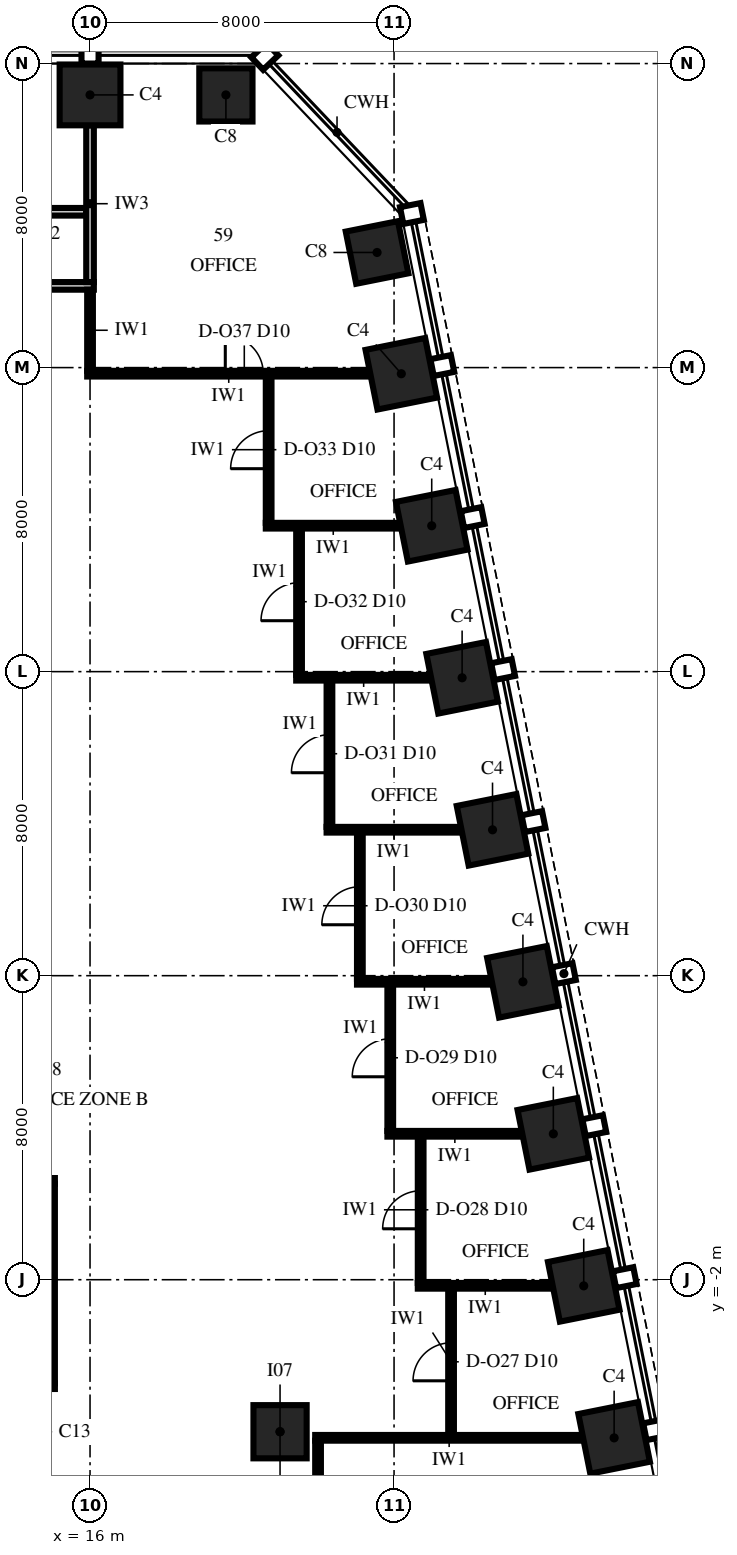
"""IFC4 building model, lengths in metres.
Left out: names, types, materials, properties, quantities, classifications, styles, units other than length and angle.
Written with IfcOpenShell. Run it as: python <this file> out.ifc"""

import sys

from ifc_helpers import new_model, si_unit, direction, frame, frame_2d, origin, origin_2d, place, context, subcontext, project, spatial, rectangle, extrude, element, fill, save


model = new_model("IFC4")
c1 = context("Model", 3, precision=1e-05, world=origin(), true_north=direction((0.0, 1.0)))
c2 = subcontext(c1, "Body", "Model", "MODEL_VIEW")
j1 = project(units=[si_unit("LENGTHUNIT", "METRE"), si_unit("PLANEANGLEUNIT", "RADIAN")], contexts=[c1])
p1 = place(None, origin())
s1 = spatial("IfcSite", under=j1, at=p1, CompositionType="ELEMENT")
p2 = place(p1, origin())
s2 = spatial("IfcBuilding", under=s1, at=p2, CompositionType="ELEMENT")
p3 = place(p2, frame((0.0, 0.0, 202.0)))
s3 = spatial("IfcBuildingStorey", under=s2, at=p3, CompositionType="ELEMENT", Elevation=202.0)
for number, where, z_axis, x_axis in (
    (1, (29.791, -6.162, 0.0), (0.0, 0.0, 1.0), (-0.196, 0.981, 0.0)),
    (2, (28.991, -2.162, 0.0), (0.0, 0.0, 1.0), (-0.196, 0.981, 0.0)),
    (3, (28.191, 1.838, 0.0), (0.0, 0.0, 1.0), (-0.196, 0.981, 0.0)),
    (4, (27.391, 5.838, 0.0), (0.0, 0.0, 1.0), (-0.196, 0.981, 0.0)),
    (5, (26.591, 9.838, 0.0), (0.0, 0.0, 1.0), (-0.196, 0.981, 0.0)),
    (6, (25.791, 13.838, 0.0), (0.0, 0.0, 1.0), (-0.196, 0.981, 0.0)),
    (7, (24.991, 17.838, 0.0), (0.0, 0.0, 1.0), (-0.196, 0.981, 0.0)),
    (8, (24.191, 21.838, 0.0), (0.0, 0.0, 1.0), (-0.196, 0.981, 0.0)),
):
    element("IfcColumn", number, at=place(p3, frame(where, z_axis=z_axis, x_axis=x_axis)), inside=s3, PredefinedType="COLUMN", context=c2, shape_type="SweptSolid", body=[
        extrude(rectangle(XDim=1.6, YDim=1.6, at=origin_2d()), origin(), (0.0, 0.0, 1.0), 4.0),
    ])
for number, where, z_axis, x_axis in (
    (9, (23.553, 25.029, 0.0), (0.0, 0.0, 1.0), (-0.196, 0.981, 0.0)),
    (10, (19.575, 29.175, 0.0), (0.0, 0.0, 1.0), (-1.0, 0.0, 0.0)),
):
    element("IfcColumn", number, at=place(p3, frame(where, z_axis=z_axis, x_axis=x_axis)), inside=s3, PredefinedType="COLUMN", context=c2, shape_type="SweptSolid", body=[
        extrude(rectangle(XDim=1.4, YDim=1.4, at=origin_2d()), origin(), (0.0, 0.0, 1.0), 4.0),
    ])
p4 = place(p3, frame((16.0, 29.175, 0.0), z_axis=(0.0, 0.0, 1.0), x_axis=(-1.0, 0.0, 0.0)))
e11 = element("IfcColumn", 11, at=p4, inside=s3, PredefinedType="COLUMN", context=c2, shape_type="SweptSolid", body=[
    extrude(rectangle(XDim=1.6, YDim=1.6, at=origin_2d()), origin(), (0.0, 0.0, 1.0), 4.0),
])
p5 = place(p3, frame((21.0, -6.0, 0.0), z_axis=(0.0, 0.0, 1.0), x_axis=(1.0, 0.0, 0.0)))
e12 = element("IfcColumn", 12, at=p5, inside=s3, PredefinedType="COLUMN", context=c2, shape_type="SweptSolid", body=[
    extrude(rectangle(XDim=1.4, YDim=1.4, at=origin_2d()), origin(), (0.0, 0.0, 1.0), 4.0),
])
p6 = place(p3, frame((21.925, -6.16, 0.0), z_axis=(0.0, 0.0, 1.0), x_axis=(1.0, 0.0, 0.0)))
e13 = element("IfcWall", 13, at=p6, inside=s3, PredefinedType="PARTITIONING", context=c2, shape_type="SweptSolid", body=[
    extrude(rectangle(XDim=7.05, YDim=0.15, at=frame_2d((3.525, 0.0))), origin(), (0.0, 0.0, 1.0), 2.842),
])
p7 = place(p3, frame((12.0, -4.8, 0.0), z_axis=(0.0, 0.0, 1.0), x_axis=(1.0, 0.0, 0.0)))
e14 = element("IfcWall", 14, at=p7, inside=s3, PredefinedType="PARTITIONING", context=c2, shape_type="SweptSolid", body=[
    extrude(rectangle(XDim=3.075, YDim=0.15, at=frame_2d((1.538, 0.0))), origin(), (0.0, 0.0, 1.0), 3.25),
])
p8 = place(p3, frame((24.625, -2.16, 0.0), z_axis=(0.0, 0.0, 1.0), x_axis=(1.0, 0.0, 0.0)))
e15 = element("IfcWall", 15, at=p8, inside=s3, PredefinedType="PARTITIONING", context=c2, shape_type="SweptSolid", body=[
    extrude(rectangle(XDim=3.55, YDim=0.15, at=frame_2d((1.775, 0.0))), origin(), (0.0, 0.0, 1.0), 3.25),
])
p9 = place(p3, frame((12.0, 0.6, 0.0), z_axis=(0.0, 0.0, 1.0), x_axis=(1.0, 0.0, 0.0)))
e16 = element("IfcWall", 16, at=p9, inside=s3, PredefinedType="PARTITIONING", context=c2, shape_type="SweptSolid", body=[
    extrude(rectangle(XDim=3.075, YDim=0.15, at=frame_2d((1.538, 0.0))), origin(), (0.0, 0.0, 1.0), 3.25),
])
p10 = place(p9, frame((1.0, 0.0, 0.0)))
e17 = element("IfcOpeningElement", 17, at=p10, cuts=e16, PredefinedType="OPENING", context=c2, shape_type="SweptSolid", body=[
    extrude(rectangle(XDim=1.0, YDim=2.3, at=frame_2d((0.5, 1.15))), frame((0.0, 0.09, 0.0), z_axis=(0.0, -1.0, 0.0), x_axis=(1.0, 0.0, 0.0)), (0.0, 0.0, 1.0), 0.18),
])
p11 = place(p3, frame((23.825, 1.84, 0.0), z_axis=(0.0, 0.0, 1.0), x_axis=(1.0, 0.0, 0.0)))
e18 = element("IfcWall", 18, at=p11, inside=s3, PredefinedType="PARTITIONING", context=c2, shape_type="SweptSolid", body=[
    extrude(rectangle(XDim=3.55, YDim=0.15, at=frame_2d((1.775, 0.0))), origin(), (0.0, 0.0, 1.0), 3.25),
])
p12 = place(p3, frame((23.025, 5.84, 0.0), z_axis=(0.0, 0.0, 1.0), x_axis=(1.0, 0.0, 0.0)))
e19 = element("IfcWall", 19, at=p12, inside=s3, PredefinedType="PARTITIONING", context=c2, shape_type="SweptSolid", body=[
    extrude(rectangle(XDim=3.55, YDim=0.15, at=frame_2d((1.775, 0.0))), origin(), (0.0, 0.0, 1.0), 2.842),
])
for number, where, z_axis, x_axis in (
    (20, (22.225, 9.84, 0.0), (0.0, 0.0, 1.0), (1.0, 0.0, 0.0)),
    (21, (21.425, 13.84, 0.0), (0.0, 0.0, 1.0), (1.0, 0.0, 0.0)),
    (22, (20.625, 17.84, 0.0), (0.0, 0.0, 1.0), (1.0, 0.0, 0.0)),
):
    element("IfcWall", number, at=place(p3, frame(where, z_axis=z_axis, x_axis=x_axis)), inside=s3, PredefinedType="PARTITIONING", context=c2, shape_type="SweptSolid", body=[
        extrude(rectangle(XDim=3.55, YDim=0.15, at=frame_2d((1.775, 0.0))), origin(), (0.0, 0.0, 1.0), 3.25),
    ])
p13 = place(p3, frame((15.925, 21.84, 0.0), z_axis=(0.0, 0.0, 1.0), x_axis=(1.0, 0.0, 0.0)))
e23 = element("IfcWall", 23, at=p13, inside=s3, PredefinedType="PARTITIONING", context=c2, shape_type="SweptSolid", body=[
    extrude(rectangle(XDim=7.45, YDim=0.15, at=frame_2d((3.725, 0.0))), origin(), (0.0, 0.0, 1.0), 3.25),
])
p14 = place(p13, frame((3.634, 0.0, 0.0)))
e24 = element("IfcOpeningElement", 24, at=p14, cuts=e23, PredefinedType="OPENING", context=c2, shape_type="SweptSolid", body=[
    extrude(rectangle(XDim=1.0, YDim=2.3, at=frame_2d((0.5, 1.15))), frame((0.0, 0.09, 0.0), z_axis=(0.0, -1.0, 0.0), x_axis=(1.0, 0.0, 0.0)), (0.0, 0.0, 1.0), 0.18),
])
p15 = place(p3, frame((14.18, 24.15, 0.0), z_axis=(0.0, 0.0, 1.0), x_axis=(1.0, 0.0, 0.0)))
e25 = element("IfcWall", 25, at=p15, inside=s3, PredefinedType="PARTITIONING", context=c2, shape_type="SweptSolid", body=[
    extrude(rectangle(XDim=1.92, YDim=0.2, at=frame_2d((0.96, 0.0))), origin(), (0.0, 0.0, 1.0), 3.4),
])
p16 = place(p3, frame((-16.2, 26.1, 0.0), z_axis=(0.0, 0.0, 1.0), x_axis=(1.0, 0.0, 0.0)))
e26 = element("IfcWall", 26, at=p16, inside=s3, PredefinedType="PARTITIONING", context=c2, shape_type="SweptSolid", body=[
    extrude(rectangle(XDim=32.1, YDim=0.2, at=frame_2d((16.05, 0.0))), origin(), (0.0, 0.0, 1.0), 3.4),
])
p17 = place(p16, frame((1.6, 0.0, 0.0)))
e27 = element("IfcOpeningElement", 27, at=p17, cuts=e26, PredefinedType="OPENING", context=c2, shape_type="SweptSolid", body=[
    extrude(rectangle(XDim=1.2, YDim=2.4, at=frame_2d((0.6, 1.2))), frame((0.0, 0.115, 0.0), z_axis=(0.0, -1.0, 0.0), x_axis=(1.0, 0.0, 0.0)), (0.0, 0.0, 1.0), 0.23),
])
p18 = place(p16, frame((5.6, 0.0, 0.0)))
e28 = element("IfcOpeningElement", 28, at=p18, cuts=e26, PredefinedType="OPENING", context=c2, shape_type="SweptSolid", body=[
    extrude(rectangle(XDim=1.2, YDim=2.4, at=frame_2d((0.6, 1.2))), frame((0.0, 0.115, 0.0), z_axis=(0.0, -1.0, 0.0), x_axis=(1.0, 0.0, 0.0)), (0.0, 0.0, 1.0), 0.23),
])
p19 = place(p16, frame((9.6, 0.0, 0.0)))
e29 = element("IfcOpeningElement", 29, at=p19, cuts=e26, PredefinedType="OPENING", context=c2, shape_type="SweptSolid", body=[
    extrude(rectangle(XDim=1.2, YDim=2.4, at=frame_2d((0.6, 1.2))), frame((0.0, 0.115, 0.0), z_axis=(0.0, -1.0, 0.0), x_axis=(1.0, 0.0, 0.0)), (0.0, 0.0, 1.0), 0.23),
])
p20 = place(p16, frame((13.6, 0.0, 0.0)))
e30 = element("IfcOpeningElement", 30, at=p20, cuts=e26, PredefinedType="OPENING", context=c2, shape_type="SweptSolid", body=[
    extrude(rectangle(XDim=1.2, YDim=2.4, at=frame_2d((0.6, 1.2))), frame((0.0, 0.115, 0.0), z_axis=(0.0, -1.0, 0.0), x_axis=(1.0, 0.0, 0.0)), (0.0, 0.0, 1.0), 0.23),
])
p21 = place(p16, frame((17.6, 0.0, 0.0)))
e31 = element("IfcOpeningElement", 31, at=p21, cuts=e26, PredefinedType="OPENING", context=c2, shape_type="SweptSolid", body=[
    extrude(rectangle(XDim=1.2, YDim=2.4, at=frame_2d((0.6, 1.2))), frame((0.0, 0.115, 0.0), z_axis=(0.0, -1.0, 0.0), x_axis=(1.0, 0.0, 0.0)), (0.0, 0.0, 1.0), 0.23),
])
p22 = place(p16, frame((21.6, 0.0, 0.0)))
e32 = element("IfcOpeningElement", 32, at=p22, cuts=e26, PredefinedType="OPENING", context=c2, shape_type="SweptSolid", body=[
    extrude(rectangle(XDim=1.2, YDim=2.4, at=frame_2d((0.6, 1.2))), frame((0.0, 0.115, 0.0), z_axis=(0.0, -1.0, 0.0), x_axis=(1.0, 0.0, 0.0)), (0.0, 0.0, 1.0), 0.23),
])
p23 = place(p16, frame((25.6, 0.0, 0.0)))
e33 = element("IfcOpeningElement", 33, at=p23, cuts=e26, PredefinedType="OPENING", context=c2, shape_type="SweptSolid", body=[
    extrude(rectangle(XDim=1.2, YDim=2.4, at=frame_2d((0.6, 1.2))), frame((0.0, 0.115, 0.0), z_axis=(0.0, -1.0, 0.0), x_axis=(1.0, 0.0, 0.0)), (0.0, 0.0, 1.0), 0.23),
])
p24 = place(p16, frame((29.6, 0.0, 0.0)))
e34 = element("IfcOpeningElement", 34, at=p24, cuts=e26, PredefinedType="OPENING", context=c2, shape_type="SweptSolid", body=[
    extrude(rectangle(XDim=1.2, YDim=2.4, at=frame_2d((0.6, 1.2))), frame((0.0, 0.115, 0.0), z_axis=(0.0, -1.0, 0.0), x_axis=(1.0, 0.0, 0.0)), (0.0, 0.0, 1.0), 0.23),
])
p25 = place(p3, frame((15.0, -4.725, 0.0), z_axis=(0.0, 0.0, 1.0), x_axis=(0.0, 1.0, 0.0)))
e35 = element("IfcWall", 35, at=p25, inside=s3, PredefinedType="PARTITIONING", context=c2, shape_type="SweptSolid", body=[
    extrude(rectangle(XDim=5.25, YDim=0.15, at=frame_2d((2.625, 0.0))), origin(), (0.0, 0.0, 1.0), 3.85),
])
p26 = place(p3, frame((16.0, 21.915, 0.0), z_axis=(0.0, 0.0, 1.0), x_axis=(0.0, 1.0, 0.0)))
e36 = element("IfcWall", 36, at=p26, inside=s3, PredefinedType="PARTITIONING", context=c2, shape_type="SweptSolid", body=[
    extrude(rectangle(XDim=2.135, YDim=0.15, at=frame_2d((1.067, 0.0))), origin(), (0.0, 0.0, 1.0), 3.4),
])
p27 = place(p3, frame((16.0, 24.25, 0.0), z_axis=(0.0, 0.0, 1.0), x_axis=(0.0, 1.0, 0.0)))
e37 = element("IfcWall", 37, at=p27, inside=s3, PredefinedType="PARTITIONING", context=c2, shape_type="SweptSolid", body=[
    extrude(rectangle(XDim=4.125, YDim=0.2, at=frame_2d((2.062, 0.0))), origin(), (0.0, 0.0, 1.0), 3.4),
])
p28 = place(p3, frame((20.7, 17.915, 0.0), z_axis=(0.0, 0.0, 1.0), x_axis=(0.0, 1.0, 0.0)))
e38 = element("IfcWall", 38, at=p28, inside=s3, PredefinedType="PARTITIONING", context=c2, shape_type="SweptSolid", body=[
    extrude(rectangle(XDim=3.85, YDim=0.15, at=frame_2d((1.925, 0.0))), origin(), (0.0, 0.0, 1.0), 3.25),
])
p29 = place(p28, frame((1.425, 0.0, 0.0)))
e39 = element("IfcOpeningElement", 39, at=p29, cuts=e38, PredefinedType="OPENING", context=c2, shape_type="SweptSolid", body=[
    extrude(rectangle(XDim=1.0, YDim=2.3, at=frame_2d((0.5, 1.15))), frame((0.0, 0.09, 0.0), z_axis=(0.0, -1.0, 0.0), x_axis=(1.0, 0.0, 0.0)), (0.0, 0.0, 1.0), 0.18),
])
p30 = place(p3, frame((21.5, 13.915, 0.0), z_axis=(0.0, 0.0, 1.0), x_axis=(0.0, 1.0, 0.0)))
e40 = element("IfcWall", 40, at=p30, inside=s3, PredefinedType="PARTITIONING", context=c2, shape_type="SweptSolid", body=[
    extrude(rectangle(XDim=3.85, YDim=0.15, at=frame_2d((1.925, 0.0))), origin(), (0.0, 0.0, 1.0), 3.25),
])
p31 = place(p30, frame((1.425, 0.0, 0.0)))
e41 = element("IfcOpeningElement", 41, at=p31, cuts=e40, PredefinedType="OPENING", context=c2, shape_type="SweptSolid", body=[
    extrude(rectangle(XDim=1.0, YDim=2.3, at=frame_2d((0.5, 1.15))), frame((0.0, 0.09, 0.0), z_axis=(0.0, -1.0, 0.0), x_axis=(1.0, 0.0, 0.0)), (0.0, 0.0, 1.0), 0.18),
])
p32 = place(p3, frame((22.0, -16.375, 0.0), z_axis=(0.0, 0.0, 1.0), x_axis=(0.0, 1.0, 0.0)))
e42 = element("IfcWall", 42, at=p32, inside=s3, PredefinedType="PARTITIONING", context=c2, shape_type="SweptSolid", body=[
    extrude(rectangle(XDim=10.14, YDim=0.15, at=frame_2d((5.07, 0.0))), origin(), (0.0, 0.0, 1.0), 3.25),
])
p33 = place(p32, frame((5.975, 0.0, 0.0)))
e43 = element("IfcOpeningElement", 43, at=p33, cuts=e42, PredefinedType="OPENING", context=c2, shape_type="SweptSolid", body=[
    extrude(rectangle(XDim=1.8, YDim=2.4, at=frame_2d((0.9, 1.2))), frame((0.0, 0.09, 0.0), z_axis=(0.0, -1.0, 0.0), x_axis=(1.0, 0.0, 0.0)), (0.0, 0.0, 1.0), 0.18),
])
p34 = place(p3, frame((22.3, 9.915, 0.0), z_axis=(0.0, 0.0, 1.0), x_axis=(0.0, 1.0, 0.0)))
e44 = element("IfcWall", 44, at=p34, inside=s3, PredefinedType="PARTITIONING", context=c2, shape_type="SweptSolid", body=[
    extrude(rectangle(XDim=3.85, YDim=0.15, at=frame_2d((1.925, 0.0))), origin(), (0.0, 0.0, 1.0), 3.85),
])
p35 = place(p34, frame((1.425, 0.0, 0.0)))
e45 = element("IfcOpeningElement", 45, at=p35, cuts=e44, PredefinedType="OPENING", context=c2, shape_type="SweptSolid", body=[
    extrude(rectangle(XDim=1.0, YDim=2.3, at=frame_2d((0.5, 1.15))), frame((0.0, 0.09, 0.0), z_axis=(0.0, -1.0, 0.0), x_axis=(1.0, 0.0, 0.0)), (0.0, 0.0, 1.0), 0.18),
])
p36 = place(p3, frame((23.1, 5.915, 0.0), z_axis=(0.0, 0.0, 1.0), x_axis=(0.0, 1.0, 0.0)))
e46 = element("IfcWall", 46, at=p36, inside=s3, PredefinedType="PARTITIONING", context=c2, shape_type="SweptSolid", body=[
    extrude(rectangle(XDim=3.85, YDim=0.15, at=frame_2d((1.925, 0.0))), origin(), (0.0, 0.0, 1.0), 2.842),
])
p37 = place(p36, frame((1.425, 0.0, 0.0)))
e47 = element("IfcOpeningElement", 47, at=p37, cuts=e46, PredefinedType="OPENING", context=c2, shape_type="SweptSolid", body=[
    extrude(rectangle(XDim=1.0, YDim=2.3, at=frame_2d((0.5, 1.15))), frame((0.0, 0.09, 0.0), z_axis=(0.0, -1.0, 0.0), x_axis=(1.0, 0.0, 0.0)), (0.0, 0.0, 1.0), 0.18),
])
p38 = place(p3, frame((23.9, 1.915, 0.0), z_axis=(0.0, 0.0, 1.0), x_axis=(0.0, 1.0, 0.0)))
e48 = element("IfcWall", 48, at=p38, inside=s3, PredefinedType="PARTITIONING", context=c2, shape_type="SweptSolid", body=[
    extrude(rectangle(XDim=3.85, YDim=0.15, at=frame_2d((1.925, 0.0))), origin(), (0.0, 0.0, 1.0), 3.85),
])
p39 = place(p38, frame((1.425, 0.0, 0.0)))
e49 = element("IfcOpeningElement", 49, at=p39, cuts=e48, PredefinedType="OPENING", context=c2, shape_type="SweptSolid", body=[
    extrude(rectangle(XDim=1.0, YDim=2.3, at=frame_2d((0.5, 1.15))), frame((0.0, 0.09, 0.0), z_axis=(0.0, -1.0, 0.0), x_axis=(1.0, 0.0, 0.0)), (0.0, 0.0, 1.0), 0.18),
])
p40 = place(p3, frame((24.7, -2.085, 0.0), z_axis=(0.0, 0.0, 1.0), x_axis=(0.0, 1.0, 0.0)))
e50 = element("IfcWall", 50, at=p40, inside=s3, PredefinedType="PARTITIONING", context=c2, shape_type="SweptSolid", body=[
    extrude(rectangle(XDim=3.85, YDim=0.15, at=frame_2d((1.925, 0.0))), origin(), (0.0, 0.0, 1.0), 3.85),
])
p41 = place(p40, frame((1.425, 0.0, 0.0)))
e51 = element("IfcOpeningElement", 51, at=p41, cuts=e50, PredefinedType="OPENING", context=c2, shape_type="SweptSolid", body=[
    extrude(rectangle(XDim=1.0, YDim=2.3, at=frame_2d((0.5, 1.15))), frame((0.0, 0.09, 0.0), z_axis=(0.0, -1.0, 0.0), x_axis=(1.0, 0.0, 0.0)), (0.0, 0.0, 1.0), 0.18),
])
p42 = place(p3, frame((25.5, -6.085, 0.0), z_axis=(0.0, 0.0, 1.0), x_axis=(0.0, 1.0, 0.0)))
e52 = element("IfcWall", 52, at=p42, inside=s3, PredefinedType="PARTITIONING", context=c2, shape_type="SweptSolid", body=[
    extrude(rectangle(XDim=3.85, YDim=0.15, at=frame_2d((1.925, 0.0))), origin(), (0.0, 0.0, 1.0), 2.842),
])
p43 = place(p42, frame((1.425, 0.0, 0.0)))
e53 = element("IfcOpeningElement", 53, at=p43, cuts=e52, PredefinedType="OPENING", context=c2, shape_type="SweptSolid", body=[
    extrude(rectangle(XDim=1.0, YDim=2.3, at=frame_2d((0.5, 1.15))), frame((0.0, 0.09, 0.0), z_axis=(0.0, -1.0, 0.0), x_axis=(1.0, 0.0, 0.0)), (0.0, 0.0, 1.0), 0.18),
])
p44 = place(p43, origin())
e54 = element("IfcDoor", 54, at=p44, inside=s3, OperationType="SINGLE_SWING_LEFT", PredefinedType="DOOR", context=c2, shape_type="SweptSolid", body=[
    extrude(rectangle(XDim=1.0, YDim=2.3, at=frame_2d((0.5, 1.15))), frame((0.0, 0.075, 0.0), z_axis=(0.0, -1.0, 0.0), x_axis=(1.0, 0.0, 0.0)), (0.0, 0.0, 1.0), 0.149),
])
fill(e53, e54)
p45 = place(p41, origin())
e55 = element("IfcDoor", 55, at=p45, inside=s3, OperationType="SINGLE_SWING_LEFT", PredefinedType="DOOR", context=c2, shape_type="SweptSolid", body=[
    extrude(rectangle(XDim=1.0, YDim=2.3, at=frame_2d((0.5, 1.15))), frame((0.0, 0.075, 0.0), z_axis=(0.0, -1.0, 0.0), x_axis=(1.0, 0.0, 0.0)), (0.0, 0.0, 1.0), 0.149),
])
fill(e51, e55)
p46 = place(p39, origin())
e56 = element("IfcDoor", 56, at=p46, inside=s3, OperationType="SINGLE_SWING_LEFT", PredefinedType="DOOR", context=c2, shape_type="SweptSolid", body=[
    extrude(rectangle(XDim=1.0, YDim=2.3, at=frame_2d((0.5, 1.15))), frame((0.0, 0.075, 0.0), z_axis=(0.0, -1.0, 0.0), x_axis=(1.0, 0.0, 0.0)), (0.0, 0.0, 1.0), 0.149),
])
fill(e49, e56)
p47 = place(p37, origin())
e57 = element("IfcDoor", 57, at=p47, inside=s3, OperationType="SINGLE_SWING_LEFT", PredefinedType="DOOR", context=c2, shape_type="SweptSolid", body=[
    extrude(rectangle(XDim=1.0, YDim=2.3, at=frame_2d((0.5, 1.15))), frame((0.0, 0.075, 0.0), z_axis=(0.0, -1.0, 0.0), x_axis=(1.0, 0.0, 0.0)), (0.0, 0.0, 1.0), 0.149),
])
fill(e47, e57)
p48 = place(p35, origin())
e58 = element("IfcDoor", 58, at=p48, inside=s3, OperationType="SINGLE_SWING_LEFT", PredefinedType="DOOR", context=c2, shape_type="SweptSolid", body=[
    extrude(rectangle(XDim=1.0, YDim=2.3, at=frame_2d((0.5, 1.15))), frame((0.0, 0.075, 0.0), z_axis=(0.0, -1.0, 0.0), x_axis=(1.0, 0.0, 0.0)), (0.0, 0.0, 1.0), 0.149),
])
fill(e45, e58)
p49 = place(p31, origin())
e59 = element("IfcDoor", 59, at=p49, inside=s3, OperationType="SINGLE_SWING_LEFT", PredefinedType="DOOR", context=c2, shape_type="SweptSolid", body=[
    extrude(rectangle(XDim=1.0, YDim=2.3, at=frame_2d((0.5, 1.15))), frame((0.0, 0.075, 0.0), z_axis=(0.0, -1.0, 0.0), x_axis=(1.0, 0.0, 0.0)), (0.0, 0.0, 1.0), 0.149),
])
fill(e41, e59)
p50 = place(p29, origin())
e60 = element("IfcDoor", 60, at=p50, inside=s3, OperationType="SINGLE_SWING_LEFT", PredefinedType="DOOR", context=c2, shape_type="SweptSolid", body=[
    extrude(rectangle(XDim=1.0, YDim=2.3, at=frame_2d((0.5, 1.15))), frame((0.0, 0.075, 0.0), z_axis=(0.0, -1.0, 0.0), x_axis=(1.0, 0.0, 0.0)), (0.0, 0.0, 1.0), 0.149),
])
fill(e39, e60)
p51 = place(p14, origin())
e61 = element("IfcDoor", 61, at=p51, inside=s3, OperationType="SINGLE_SWING_LEFT", PredefinedType="DOOR", context=c2, shape_type="SweptSolid", body=[
    extrude(rectangle(XDim=1.0, YDim=2.3, at=frame_2d((0.5, 1.15))), frame((0.0, 0.075, 0.0), z_axis=(0.0, -1.0, 0.0), x_axis=(1.0, 0.0, 0.0)), (0.0, 0.0, 1.0), 0.149),
])
fill(e24, e61)
save(model, sys.argv[1])
